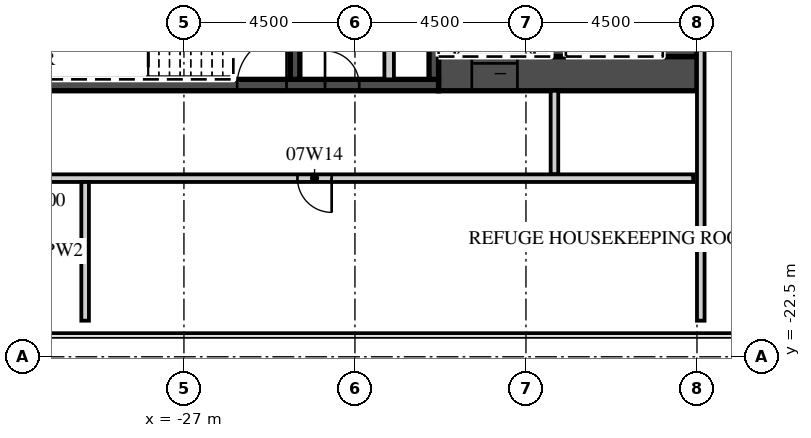
"""IFC4 building model, lengths in metres.
Left out: names, types, materials, properties, quantities, classifications, styles, units other than length and angle.
Written with IfcOpenShell. Run it as: python <this file> out.ifc"""

import sys

from ifc_helpers import new_model, si_unit, direction, frame, frame_2d, origin, place, context, subcontext, project, spatial, rectangle, extrude, element, fill, save


model = new_model("IFC4")
c1 = context("Model", 3, precision=1e-05, world=origin(), true_north=direction((0.0, 1.0)))
c2 = subcontext(c1, "Body", "Model", "MODEL_VIEW")
j1 = project(units=[si_unit("LENGTHUNIT", "METRE"), si_unit("PLANEANGLEUNIT", "RADIAN")], contexts=[c1])
p1 = place(None, origin())
s1 = spatial("IfcSite", under=j1, at=p1, CompositionType="ELEMENT")
p2 = place(p1, origin())
s2 = spatial("IfcBuilding", under=s1, at=p2, CompositionType="ELEMENT")
p3 = place(p2, frame((0.0, 0.0, 47.0)))
s3 = spatial("IfcBuildingStorey", under=s2, at=p3, CompositionType="ELEMENT", Elevation=47.0)
p4 = place(p3, frame((-20.3, -15.05, 0.0), z_axis=(0.0, 0.0, 1.0), x_axis=(1.0, 0.0, 0.0)))
e1 = element("IfcWall", 1, at=p4, inside=s3, PredefinedType="SHEAR", context=c2, shape_type="SweptSolid", body=[
    extrude(rectangle(XDim=6.8, YDim=0.9, at=frame_2d((3.4, 0.0))), origin(), (0.0, 0.0, 1.0), 5.6),
])
p5 = place(p4, frame((0.875, 0.0, 0.0)))
e2 = element("IfcOpeningElement", 2, at=p5, cuts=e1, PredefinedType="OPENING", context=c2, shape_type="SweptSolid", body=[
    extrude(rectangle(XDim=1.2, YDim=2.1, at=frame_2d((0.6, 1.05))), frame((0.0, 0.46, 0.0), z_axis=(0.0, -1.0, 0.0), x_axis=(1.0, 0.0, 0.0)), (0.0, 0.0, 1.0), 0.92),
])
p6 = place(p3, frame((-30.6, -15.35, 0.0), z_axis=(0.0, 0.0, 1.0), x_axis=(1.0, 0.0, 0.0)))
e3 = element("IfcWall", 3, at=p6, inside=s3, PredefinedType="SHEAR", context=c2, shape_type="SweptSolid", body=[
    extrude(rectangle(XDim=10.3, YDim=0.3, at=frame_2d((5.15, 0.0))), origin(), (0.0, 0.0, 1.0), 5.6),
])
p7 = place(p6, frame((5.0, 0.0, 0.0)))
e4 = element("IfcOpeningElement", 4, at=p7, cuts=e3, PredefinedType="OPENING", context=c2, shape_type="SweptSolid", body=[
    extrude(rectangle(XDim=1.3, YDim=2.1, at=frame_2d((0.65, 1.05))), frame((0.0, 0.16, 0.0), z_axis=(0.0, -1.0, 0.0), x_axis=(1.0, 0.0, 0.0)), (0.0, 0.0, 1.0), 0.32),
])
p8 = place(p6, frame((7.312, 0.0, 0.0)))
e5 = element("IfcOpeningElement", 5, at=p8, cuts=e3, PredefinedType="OPENING", context=c2, shape_type="SweptSolid", body=[
    extrude(rectangle(XDim=0.9, YDim=2.1, at=frame_2d((0.45, 1.05))), frame((0.0, 0.16, 0.0), z_axis=(0.0, -1.0, 0.0), x_axis=(1.0, 0.0, 0.0)), (0.0, 0.0, 1.0), 0.32),
])
p9 = place(p3, frame((-13.95, -14.6, 0.0), z_axis=(0.0, 0.0, 1.0), x_axis=(0.0, 1.0, 0.0)))
e6 = element("IfcWall", 6, at=p9, inside=s3, PredefinedType="SHEAR", context=c2, shape_type="SweptSolid", body=[
    extrude(rectangle(XDim=12.2, YDim=0.9, at=frame_2d((6.1, 0.0))), origin(), (0.0, 0.0, 1.0), 5.6),
])
p10 = place(p3, frame((-17.15, -14.6, 0.0), z_axis=(0.0, 0.0, 1.0), x_axis=(0.0, 1.0, 0.0)))
e7 = element("IfcWall", 7, at=p10, inside=s3, PredefinedType="SHEAR", context=c2, shape_type="SweptSolid", body=[
    extrude(rectangle(XDim=5.8, YDim=0.4, at=frame_2d((2.9, 0.0))), origin(), (0.0, 0.0, 1.0), 5.6),
])
for number, where, z_axis, x_axis in (
    (8, (-20.425, -15.2, 0.0), (0.0, 0.0, 1.0), (0.0, 1.0, 0.0)),
    (9, (-24.075, -15.2, 0.0), (0.0, 0.0, 1.0), (0.0, 1.0, 0.0)),
):
    element("IfcWall", number, at=place(p3, frame(where, z_axis=z_axis, x_axis=x_axis)), inside=s3, PredefinedType="SHEAR", context=c2, shape_type="SweptSolid", body=[
        extrude(rectangle(XDim=3.25, YDim=0.25, at=frame_2d((1.625, 0.0))), origin(), (0.0, 0.0, 1.0), 5.6),
    ])
p11 = place(p3, frame((-21.6, -15.2, 0.0), z_axis=(0.0, 0.0, 1.0), x_axis=(0.0, 1.0, 0.0)))
e10 = element("IfcWall", 10, at=p11, inside=s3, PredefinedType="PARTITIONING", context=c2, shape_type="SweptSolid", body=[
    extrude(rectangle(XDim=3.25, YDim=0.25, at=frame_2d((1.625, 0.0))), origin(), (0.0, 0.0, 1.0), 5.6),
])
p12 = place(p3, frame((-17.25, -17.7, 0.0), z_axis=(0.0, 0.0, 1.0), x_axis=(0.0, 1.0, 0.0)))
e11 = element("IfcWall", 11, at=p12, inside=s3, PredefinedType="PARTITIONING", context=c2, shape_type="SweptSolid", body=[
    extrude(rectangle(XDim=2.2, YDim=0.2, at=frame_2d((1.1, 0.0))), origin(), (0.0, 0.0, 1.0), 5.6),
])
p13 = place(p3, frame((-44.55, -17.8, 0.0), z_axis=(0.0, 0.0, 1.0), x_axis=(1.0, 0.0, 0.0)))
e12 = element("IfcWall", 12, at=p13, inside=s3, PredefinedType="PARTITIONING", context=c2, shape_type="SweptSolid", body=[
    extrude(rectangle(XDim=30.95, YDim=0.2, at=frame_2d((15.475, 0.0))), origin(), (0.0, 0.0, 1.0), 5.6),
])
p14 = place(p13, frame((12.238, 0.0, 0.0)))
e13 = element("IfcOpeningElement", 13, at=p14, cuts=e12, PredefinedType="OPENING", context=c2, shape_type="SweptSolid", body=[
    extrude(rectangle(XDim=0.9, YDim=2.1, at=frame_2d((0.45, 1.05))), frame((0.0, 0.11, 0.0), z_axis=(0.0, -1.0, 0.0), x_axis=(1.0, 0.0, 0.0)), (0.0, 0.0, 1.0), 0.22),
])
p15 = place(p13, frame((20.538, 0.0, 0.0)))
e14 = element("IfcOpeningElement", 14, at=p15, cuts=e12, PredefinedType="OPENING", context=c2, shape_type="SweptSolid", body=[
    extrude(rectangle(XDim=0.9, YDim=2.1, at=frame_2d((0.45, 1.05))), frame((0.0, 0.11, 0.0), z_axis=(0.0, -1.0, 0.0), x_axis=(1.0, 0.0, 0.0)), (0.0, 0.0, 1.0), 0.22),
])
p16 = place(p3, frame((-29.6, -21.55, 0.0), z_axis=(0.0, 0.0, 1.0), x_axis=(0.0, 1.0, 0.0)))
e15 = element("IfcWall", 15, at=p16, inside=s3, PredefinedType="PARTITIONING", context=c2, shape_type="SweptSolid", body=[
    extrude(rectangle(XDim=3.65, YDim=0.2, at=frame_2d((1.825, 0.0))), origin(), (0.0, 0.0, 1.0), 5.6),
])
p17 = place(p3, frame((-13.4, -21.55, 0.0), z_axis=(0.0, 0.0, 1.0), x_axis=(0.0, 1.0, 0.0)))
e16 = element("IfcWall", 16, at=p17, inside=s3, PredefinedType="PARTITIONING", context=c2, shape_type="SweptSolid", body=[
    extrude(rectangle(XDim=19.95, YDim=0.2, at=frame_2d((9.975, 0.0))), origin(), (0.0, 0.0, 1.0), 5.6),
])
p18 = place(p5, origin())
e17 = element("IfcDoor", 17, at=p18, inside=s3, OperationType="SLIDING_TO_LEFT", PredefinedType="DOOR", context=c2, shape_type="SweptSolid", body=[
    extrude(rectangle(XDim=1.2, YDim=2.1, at=frame_2d((0.6, 1.05))), frame((0.0, 0.025, 0.0), z_axis=(0.0, -1.0, 0.0), x_axis=(1.0, 0.0, 0.0)), (0.0, 0.0, 1.0), 0.05),
])
fill(e2, e17)
p19 = place(p7, origin())
e18 = element("IfcDoor", 18, at=p19, inside=s3, OperationType="SINGLE_SWING_RIGHT", PredefinedType="DOOR", context=c2, shape_type="SweptSolid", body=[
    extrude(rectangle(XDim=1.3, YDim=2.1, at=frame_2d((0.65, 1.05))), frame((0.0, 0.025, 0.0), z_axis=(0.0, -1.0, 0.0), x_axis=(1.0, 0.0, 0.0)), (0.0, 0.0, 1.0), 0.05),
])
fill(e4, e18)
p20 = place(p8, origin())
e19 = element("IfcDoor", 19, at=p20, inside=s3, OperationType="SINGLE_SWING_LEFT", PredefinedType="DOOR", context=c2, shape_type="SweptSolid", body=[
    extrude(rectangle(XDim=0.9, YDim=2.1, at=frame_2d((0.45, 1.05))), frame((0.0, 0.025, 0.0), z_axis=(0.0, -1.0, 0.0), x_axis=(1.0, 0.0, 0.0)), (0.0, 0.0, 1.0), 0.05),
])
fill(e5, e19)
p21 = place(p15, origin())
e20 = element("IfcDoor", 20, at=p21, inside=s3, OperationType="SINGLE_SWING_RIGHT", PredefinedType="DOOR", context=c2, shape_type="SweptSolid", body=[
    extrude(rectangle(XDim=0.9, YDim=2.1, at=frame_2d((0.45, 1.05))), frame((0.0, 0.025, 0.0), z_axis=(0.0, -1.0, 0.0), x_axis=(1.0, 0.0, 0.0)), (0.0, 0.0, 1.0), 0.05),
])
fill(e14, e20)
save(model, sys.argv[1])
